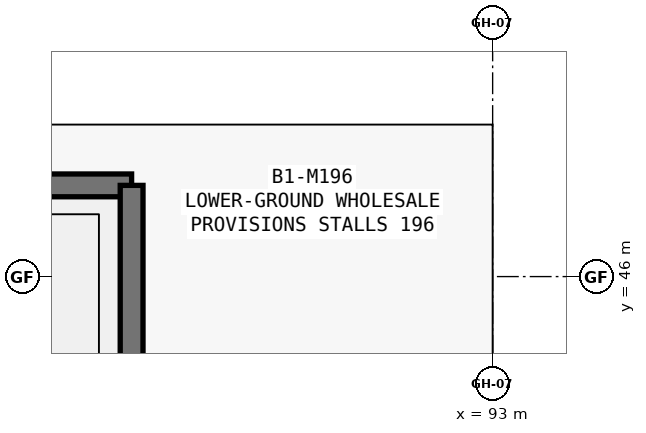
"""IFC4 building model, lengths in metres.
Left out: names, types, materials, properties, quantities, classifications, styles, units other than length and angle.
Written with IfcOpenShell. Run it as: python <this file> out.ifc"""

import sys

from ifc_helpers import new_model, si_unit, direction, frame, frame_2d, origin, place, context, subcontext, project, spatial, rectangle, extrude, element, save


model = new_model("IFC4")
c1 = context("Model", 3, precision=1e-05, world=origin(), true_north=direction((0.0, 1.0)))
c2 = subcontext(c1, "Body", "Model", "MODEL_VIEW")
j1 = project(units=[si_unit("LENGTHUNIT", "METRE"), si_unit("PLANEANGLEUNIT", "RADIAN")], contexts=[c1])
p1 = place(None, origin())
s1 = spatial("IfcSite", under=j1, at=p1, CompositionType="ELEMENT")
p2 = place(p1, origin())
s2 = spatial("IfcBuilding", under=s1, at=p2, CompositionType="ELEMENT")
p3 = place(p2, frame((0.0, 0.0, -5.4)))
s3 = spatial("IfcBuildingStorey", under=s2, at=p3, CompositionType="ELEMENT", Elevation=-5.4)
p4 = place(p3, frame((88.25, 47.2, 0.0), z_axis=(0.0, 0.0, 1.0), x_axis=(-1.0, 0.0, 0.0)))
e1 = element("IfcWall", 1, at=p4, inside=s3, PredefinedType="SHEAR", context=c2, shape_type="SweptSolid", body=[
    extrude(rectangle(XDim=4.1, YDim=0.3, at=frame_2d((2.05, 0.0))), origin(), (0.0, 0.0, 1.0), 5.4),
])
p5 = place(p3, frame((88.25, 38.5, 0.0), z_axis=(0.0, 0.0, 1.0), x_axis=(0.0, 1.0, 0.0)))
e2 = element("IfcWall", 2, at=p5, inside=s3, PredefinedType="SHEAR", context=c2, shape_type="SweptSolid", body=[
    extrude(rectangle(XDim=8.7, YDim=0.3, at=frame_2d((4.35, 0.0))), origin(), (0.0, 0.0, 1.0), 5.4),
])
p6 = place(p5, frame((0.3, 0.0, 0.0)))
e3 = element("IfcOpeningElement", 3, at=p6, cuts=e2, PredefinedType="OPENING", context=c2, shape_type="SweptSolid", body=[
    extrude(rectangle(XDim=1.02, YDim=2.1, at=frame_2d((0.51, 1.05))), frame((0.0, 0.16, 0.0), z_axis=(0.0, -1.0, 0.0), x_axis=(1.0, 0.0, 0.0)), (0.0, 0.0, 1.0), 0.32),
])
save(model, sys.argv[1])
